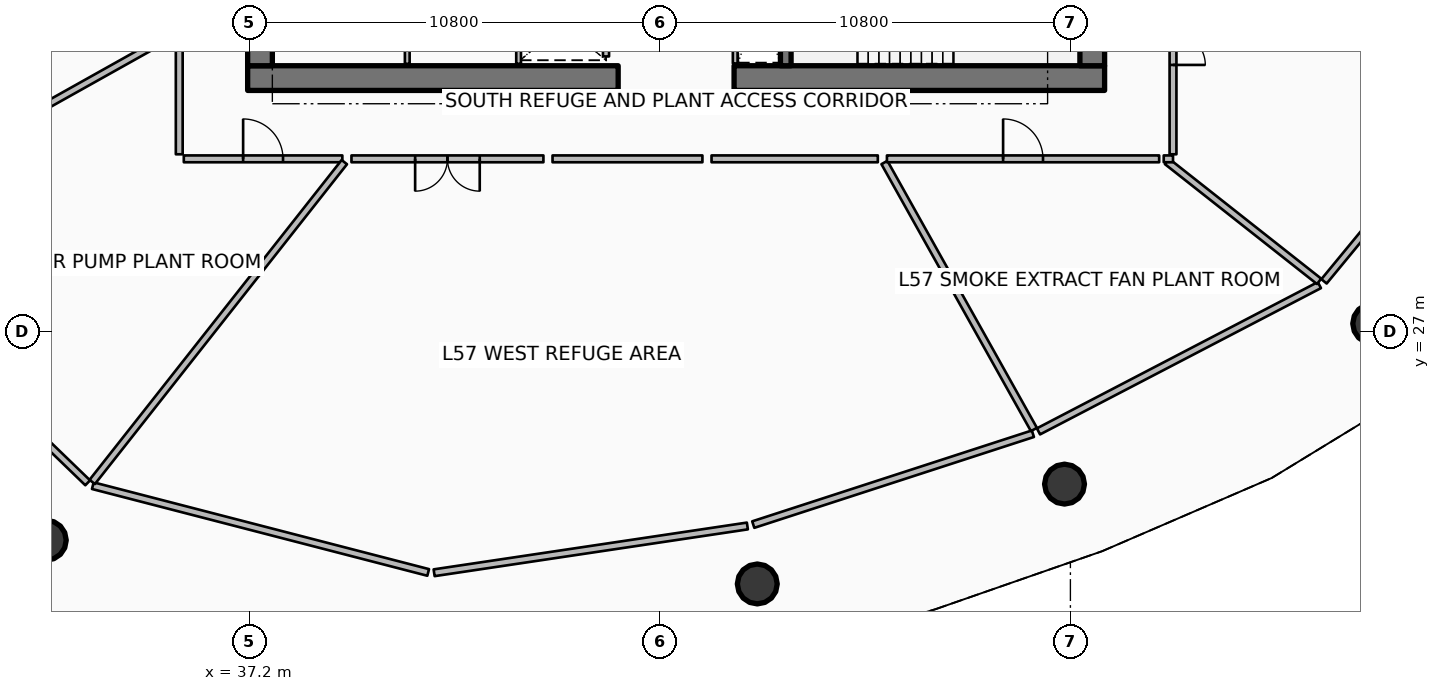
"""IFC4 building model, lengths in metres.
Left out: names, types, materials, properties, quantities, classifications, styles, units other than length and angle.
Written with IfcOpenShell. Run it as: python <this file> out.ifc"""

import sys

from ifc_helpers import new_model, si_unit, direction, frame, frame_2d, origin, origin_2d, place, context, subcontext, project, spatial, rectangle, circle, extrude, element, fill, save


model = new_model("IFC4")
c1 = context("Model", 3, precision=1e-05, world=origin(), true_north=direction((0.0, 1.0)))
c2 = subcontext(c1, "Body", "Model", "MODEL_VIEW")
j1 = project(units=[si_unit("LENGTHUNIT", "METRE"), si_unit("PLANEANGLEUNIT", "RADIAN")], contexts=[c1])
p1 = place(None, origin())
s1 = spatial("IfcSite", under=j1, at=p1, CompositionType="ELEMENT")
p2 = place(p1, origin())
s2 = spatial("IfcBuilding", under=s1, at=p2, CompositionType="ELEMENT")
p3 = place(p2, frame((0.0, 0.0, 225.3)))
s3 = spatial("IfcBuildingStorey", under=s2, at=p3, CompositionType="ELEMENT", Elevation=225.3)
for number, where, z_axis, x_axis in (
    (1, (37.15, 33.675, 0.0), (0.0, 0.0, 1.0), (1.0, 0.0, 0.0)),
    (2, (49.95, 33.675, 0.0), (0.0, 0.0, 1.0), (1.0, 0.0, 0.0)),
):
    element("IfcWall", number, at=place(p3, frame(where, z_axis=z_axis, x_axis=x_axis)), inside=s3, PredefinedType="SHEAR", context=c2, shape_type="SweptSolid", body=[
        extrude(rectangle(XDim=9.75, YDim=0.65, at=frame_2d((4.875, 0.0))), origin(), (0.0, 0.0, 1.0), 6.6),
    ])
for number, where, z_axis, x_axis in (
    (3, (37.475, 34.0, 0.0), (0.0, 0.0, 1.0), (0.0, 1.0, 0.0)),
    (4, (59.375, 34.0, 0.0), (0.0, 0.0, 1.0), (0.0, 1.0, 0.0)),
):
    element("IfcWall", number, at=place(p3, frame(where, z_axis=z_axis, x_axis=x_axis)), inside=s3, PredefinedType="SHEAR", context=c2, shape_type="SweptSolid", body=[
        extrude(rectangle(XDim=16.0, YDim=0.65, at=frame_2d((8.0, 0.0))), origin(), (0.0, 0.0, 1.0), 6.6),
    ])
p4 = place(p3, frame((51.31, 34.0, 0.0), z_axis=(0.0, 0.0, 1.0), x_axis=(0.0, 1.0, 0.0)))
e5 = element("IfcWall", 5, at=p4, inside=s3, PredefinedType="SHEAR", context=c2, shape_type="SweptSolid", body=[
    extrude(rectangle(XDim=3.5, YDim=0.28, at=frame_2d((1.75, 0.0))), origin(), (0.0, 0.0, 1.0), 6.6),
])
for number, where, z_axis, x_axis in (
    (6, (31.851, 21.515, 0.0), (0.0, 0.0, 1.0), (1.0, 0.0, 0.0)),
    (7, (50.561, 20.365, 0.0), (0.0, 0.0, 1.0), (1.0, 0.0, 0.0)),
    (8, (58.645, 22.992, 0.0), (0.0, 0.0, 1.0), (1.0, 0.0, 0.0)),
    (9, (66.755, 27.215, 0.0), (0.0, 0.0, 1.0), (1.0, 0.0, 0.0)),
):
    element("IfcColumn", number, at=place(p3, frame(where, z_axis=z_axis, x_axis=x_axis)), inside=s3, PredefinedType="COLUMN", context=c2, shape_type="SweptSolid", body=[
        extrude(circle(Radius=0.525, at=origin_2d()), origin(), (0.0, 0.0, 1.0), 6.28),
    ])
p5 = place(p3, frame((46.58, 34.245, 0.0), z_axis=(0.0, 0.0, 1.0), x_axis=(0.0, 1.0, 0.0)))
e10 = element("IfcWall", 10, at=p5, inside=s3, PredefinedType="PARTITIONING", context=c2, shape_type="SweptSolid", body=[
    extrude(rectangle(XDim=1.71, YDim=0.16, at=frame_2d((0.855, 0.0))), origin(), (0.0, 0.0, 1.0), 6.28),
])
for number, where, z_axis, x_axis in (
    (11, (44.28, 34.05, 0.0), (0.0, 0.0, 1.0), (0.0, 1.0, 0.0)),
    (12, (41.35, 34.05, 0.0), (0.0, 0.0, 1.0), (0.0, 1.0, 0.0)),
):
    element("IfcWall", number, at=place(p3, frame(where, z_axis=z_axis, x_axis=x_axis)), inside=s3, PredefinedType="PARTITIONING", context=c2, shape_type="SweptSolid", body=[
        extrude(rectangle(XDim=2.03, YDim=0.125, at=frame_2d((1.015, 0.0))), origin(), (0.0, 0.0, 1.0), 5.72),
    ])
p6 = place(p3, frame((49.98, 34.06, 0.0), z_axis=(0.0, 0.0, 1.0), x_axis=(0.0, 1.0, 0.0)))
e13 = element("IfcWall", 13, at=p6, inside=s3, PredefinedType="PARTITIONING", context=c2, shape_type="SweptSolid", body=[
    extrude(rectangle(XDim=3.4, YDim=0.125, at=frame_2d((1.7, 0.0))), origin(), (0.0, 0.0, 1.0), 5.72),
])
p7 = place(p3, frame((26.09, 29.642, 0.0), z_axis=(0.0, 0.0, 1.0), x_axis=(0.719354198581, -0.694643460334, 0.0)))
e14 = element("IfcWall", 14, at=p7, inside=s3, PredefinedType="PARTITIONING", context=c2, shape_type="SweptSolid", body=[
    extrude(rectangle(XDim=9.524, YDim=0.18, at=frame_2d((4.762, 0.0))), origin(), (0.0, 0.0, 1.0), 2.304),
])
p8 = place(p3, frame((33.076, 22.95, 0.0), z_axis=(0.0, 0.0, 1.0), x_axis=(0.968121608103, -0.250480641813, 0.0)))
e15 = element("IfcWall", 15, at=p8, inside=s3, PredefinedType="PARTITIONING", context=c2, shape_type="SweptSolid", body=[
    extrude(rectangle(XDim=9.115, YDim=0.18, at=frame_2d((4.558, 0.0))), origin(), (0.0, 0.0, 1.0), 2.304),
])
p9 = place(p3, frame((42.057, 20.659, 0.0), z_axis=(0.0, 0.0, 1.0), x_axis=(0.989036897226, 0.147668601692, 0.0)))
e16 = element("IfcWall", 16, at=p9, inside=s3, PredefinedType="PARTITIONING", context=c2, shape_type="SweptSolid", body=[
    extrude(rectangle(XDim=8.334, YDim=0.18, at=frame_2d((4.167, 0.0))), origin(), (0.0, 0.0, 1.0), 2.304),
])
p10 = place(p3, frame((50.455, 21.927, 0.0), z_axis=(0.0, 0.0, 1.0), x_axis=(0.951063515405, 0.308995452498, 0.0)))
e17 = element("IfcWall", 17, at=p10, inside=s3, PredefinedType="PARTITIONING", context=c2, shape_type="SweptSolid", body=[
    extrude(rectangle(XDim=7.737, YDim=0.18, at=frame_2d((3.868, 0.0))), origin(), (0.0, 0.0, 1.0), 5.273),
])
p11 = place(p3, frame((57.96, 24.379, 0.0), z_axis=(0.0, 0.0, 1.0), x_axis=(0.886953337161, 0.461859045271, 0.0)))
e18 = element("IfcWall", 18, at=p11, inside=s3, PredefinedType="PARTITIONING", context=c2, shape_type="SweptSolid", body=[
    extrude(rectangle(XDim=8.334, YDim=0.18, at=frame_2d((4.167, 0.0))), origin(), (0.0, 0.0, 1.0), 2.304),
])
p12 = place(p3, frame((65.474, 28.327, 0.0), z_axis=(0.0, 0.0, 1.0), x_axis=(0.636001991142, 0.771687415514, 0.0)))
e19 = element("IfcWall", 19, at=p12, inside=s3, PredefinedType="PARTITIONING", context=c2, shape_type="SweptSolid", body=[
    extrude(rectangle(XDim=9.115, YDim=0.18, at=frame_2d((4.558, 0.0))), origin(), (0.0, 0.0, 1.0), 2.304),
])
p13 = place(p3, frame((35.254, 34.862, 0.0), z_axis=(0.0, 0.0, 1.0), x_axis=(-0.872490109537, -0.488631772156, 0.0)))
e20 = element("IfcWall", 20, at=p13, inside=s3, PredefinedType="PARTITIONING", context=c2, shape_type="SweptSolid", body=[
    extrude(rectangle(XDim=10.469, YDim=0.18, at=frame_2d((5.235, 0.0))), origin(), (0.0, 0.0, 1.0), 5.273),
])
p14 = place(p3, frame((35.35, 34.796, 0.0), z_axis=(0.0, 0.0, 1.0), x_axis=(0.0, -1.0, 0.0)))
e21 = element("IfcWall", 21, at=p14, inside=s3, PredefinedType="PARTITIONING", context=c2, shape_type="SweptSolid", body=[
    extrude(rectangle(XDim=3.126, YDim=0.18, at=frame_2d((1.563, 0.0))), origin(), (0.0, 0.0, 1.0), 5.273),
])
p15 = place(p3, frame((35.47, 31.55, 0.0), z_axis=(0.0, 0.0, 1.0), x_axis=(1.0, 0.0, 0.0)))
e22 = element("IfcWall", 22, at=p15, inside=s3, PredefinedType="PARTITIONING", context=c2, shape_type="SweptSolid", body=[
    extrude(rectangle(XDim=4.172, YDim=0.18, at=frame_2d((2.086, 0.0))), origin(), (0.0, 0.0, 1.0), 2.304),
])
p16 = place(p15, frame((1.561, 0.0, 0.0)))
e23 = element("IfcOpeningElement", 23, at=p16, cuts=e22, PredefinedType="OPENING", context=c2, shape_type="SweptSolid", body=[
    extrude(rectangle(XDim=1.05, YDim=2.1, at=frame_2d((0.525, 1.05))), frame((0.0, 0.1, 0.0), z_axis=(0.0, -1.0, 0.0), x_axis=(1.0, 0.0, 0.0)), (0.0, 0.0, 1.0), 0.2),
])
p17 = place(p3, frame((39.694, 31.464, 0.0), z_axis=(0.0, 0.0, 1.0), x_axis=(-0.619085632085, -0.785323487581, 0.0)))
e24 = element("IfcWall", 24, at=p17, inside=s3, PredefinedType="PARTITIONING", context=c2, shape_type="SweptSolid", body=[
    extrude(rectangle(XDim=10.715, YDim=0.18, at=frame_2d((5.357, 0.0))), origin(), (0.0, 0.0, 1.0), 2.304),
])
p18 = place(p3, frame((39.882, 31.55, 0.0), z_axis=(0.0, 0.0, 1.0), x_axis=(1.0, 0.0, 0.0)))
e25 = element("IfcWall", 25, at=p18, inside=s3, PredefinedType="PARTITIONING", context=c2, shape_type="SweptSolid", body=[
    extrude(rectangle(XDim=5.051, YDim=0.18, at=frame_2d((2.525, 0.0))), origin(), (0.0, 0.0, 1.0), 2.304),
])
p19 = place(p18, frame((1.675, 0.0, 0.0)))
e26 = element("IfcOpeningElement", 26, at=p19, cuts=e25, PredefinedType="OPENING", context=c2, shape_type="SweptSolid", body=[
    extrude(rectangle(XDim=1.7, YDim=2.15, at=frame_2d((0.85, 1.075))), frame((0.0, 0.1, 0.0), z_axis=(0.0, -1.0, 0.0), x_axis=(1.0, 0.0, 0.0)), (0.0, 0.0, 1.0), 0.2),
])
p20 = place(p3, frame((45.173, 31.55, 0.0), z_axis=(0.0, 0.0, 1.0), x_axis=(1.0, 0.0, 0.0)))
e27 = element("IfcWall", 27, at=p20, inside=s3, PredefinedType="PARTITIONING", context=c2, shape_type="SweptSolid", body=[
    extrude(rectangle(XDim=3.944, YDim=0.18, at=frame_2d((1.972, 0.0))), origin(), (0.0, 0.0, 1.0), 2.304),
])
p21 = place(p3, frame((49.357, 31.55, 0.0), z_axis=(0.0, 0.0, 1.0), x_axis=(1.0, 0.0, 0.0)))
e28 = element("IfcWall", 28, at=p21, inside=s3, PredefinedType="PARTITIONING", context=c2, shape_type="SweptSolid", body=[
    extrude(rectangle(XDim=4.376, YDim=0.18, at=frame_2d((2.188, 0.0))), origin(), (0.0, 0.0, 1.0), 5.273),
])
p22 = place(p3, frame((53.906, 31.454, 0.0), z_axis=(0.0, 0.0, 1.0), x_axis=(0.488616295632, -0.872498776872, 0.0)))
e29 = element("IfcWall", 29, at=p22, inside=s3, PredefinedType="PARTITIONING", context=c2, shape_type="SweptSolid", body=[
    extrude(rectangle(XDim=8.052, YDim=0.18, at=frame_2d((4.026, 0.0))), origin(), (0.0, 0.0, 1.0), 5.273),
])
p23 = place(p3, frame((53.972, 31.55, 0.0), z_axis=(0.0, 0.0, 1.0), x_axis=(1.0, 0.0, 0.0)))
e30 = element("IfcWall", 30, at=p23, inside=s3, PredefinedType="PARTITIONING", context=c2, shape_type="SweptSolid", body=[
    extrude(rectangle(XDim=7.163, YDim=0.18, at=frame_2d((3.582, 0.0))), origin(), (0.0, 0.0, 1.0), 2.304),
])
p24 = place(p23, frame((3.057, 0.0, 0.0)))
e31 = element("IfcOpeningElement", 31, at=p24, cuts=e30, PredefinedType="OPENING", context=c2, shape_type="SweptSolid", body=[
    extrude(rectangle(XDim=1.05, YDim=2.1, at=frame_2d((0.525, 1.05))), frame((0.0, 0.1, 0.0), z_axis=(0.0, -1.0, 0.0), x_axis=(1.0, 0.0, 0.0)), (0.0, 0.0, 1.0), 0.2),
])
p25 = place(p3, frame((61.342, 31.482, 0.0), z_axis=(0.0, 0.0, 1.0), x_axis=(0.785303207868, -0.619111356471, 0.0)))
e32 = element("IfcWall", 32, at=p25, inside=s3, PredefinedType="PARTITIONING", context=c2, shape_type="SweptSolid", body=[
    extrude(rectangle(XDim=5.096, YDim=0.18, at=frame_2d((2.548, 0.0))), origin(), (0.0, 0.0, 1.0), 2.304),
])
p26 = place(p3, frame((61.256, 31.55, 0.0), z_axis=(0.0, 0.0, 1.0), x_axis=(1.0, 0.0, 0.0)))
e33 = element("IfcWall", 33, at=p26, inside=s3, PredefinedType="PARTITIONING", context=c2, shape_type="SweptSolid", body=[
    extrude(rectangle(XDim=0.244, YDim=0.18, at=frame_2d((0.122, 0.0))), origin(), (0.0, 0.0, 1.0), 2.304),
])
p27 = place(p3, frame((61.5, 31.67, 0.0), z_axis=(0.0, 0.0, 1.0), x_axis=(0.0, 1.0, 0.0)))
e34 = element("IfcWall", 34, at=p27, inside=s3, PredefinedType="PARTITIONING", context=c2, shape_type="SweptSolid", body=[
    extrude(rectangle(XDim=6.403, YDim=0.18, at=frame_2d((3.201, 0.0))), origin(), (0.0, 0.0, 1.0), 2.304),
])
p28 = place(p27, frame((2.351, 0.0, 0.0)))
e35 = element("IfcOpeningElement", 35, at=p28, cuts=e34, PredefinedType="OPENING", context=c2, shape_type="SweptSolid", body=[
    extrude(rectangle(XDim=1.7, YDim=2.15, at=frame_2d((0.85, 1.075))), frame((0.0, 0.1, 0.0), z_axis=(0.0, -1.0, 0.0), x_axis=(1.0, 0.0, 0.0)), (0.0, 0.0, 1.0), 0.2),
])
p29 = place(p16, origin())
e36 = element("IfcDoor", 36, at=p29, inside=s3, OperationType="SINGLE_SWING_LEFT", PredefinedType="DOOR", context=c2, shape_type="SweptSolid", body=[
    extrude(rectangle(XDim=1.05, YDim=2.1, at=frame_2d((0.525, 1.05))), frame((0.0, 0.025, 0.0), z_axis=(0.0, -1.0, 0.0), x_axis=(1.0, 0.0, 0.0)), (0.0, 0.0, 1.0), 0.05),
])
fill(e23, e36)
p30 = place(p19, origin())
e37 = element("IfcDoor", 37, at=p30, inside=s3, OperationType="DOUBLE_DOOR_SINGLE_SWING", PredefinedType="DOOR", context=c2, shape_type="SweptSolid", body=[
    extrude(rectangle(XDim=1.7, YDim=2.15, at=frame_2d((0.85, 1.075))), frame((0.0, 0.025, 0.0), z_axis=(0.0, -1.0, 0.0), x_axis=(1.0, 0.0, 0.0)), (0.0, 0.0, 1.0), 0.05),
])
fill(e26, e37)
p31 = place(p24, origin())
e38 = element("IfcDoor", 38, at=p31, inside=s3, OperationType="SINGLE_SWING_LEFT", PredefinedType="DOOR", context=c2, shape_type="SweptSolid", body=[
    extrude(rectangle(XDim=1.05, YDim=2.1, at=frame_2d((0.525, 1.05))), frame((0.0, 0.025, 0.0), z_axis=(0.0, -1.0, 0.0), x_axis=(1.0, 0.0, 0.0)), (0.0, 0.0, 1.0), 0.05),
])
fill(e31, e38)
p32 = place(p28, origin())
e39 = element("IfcDoor", 39, at=p32, inside=s3, OperationType="DOUBLE_DOOR_SINGLE_SWING", PredefinedType="DOOR", context=c2, shape_type="SweptSolid", body=[
    extrude(rectangle(XDim=1.7, YDim=2.15, at=frame_2d((0.85, 1.075))), frame((0.0, 0.025, 0.0), z_axis=(0.0, -1.0, 0.0), x_axis=(1.0, 0.0, 0.0)), (0.0, 0.0, 1.0), 0.05),
])
fill(e35, e39)
save(model, sys.argv[1])
